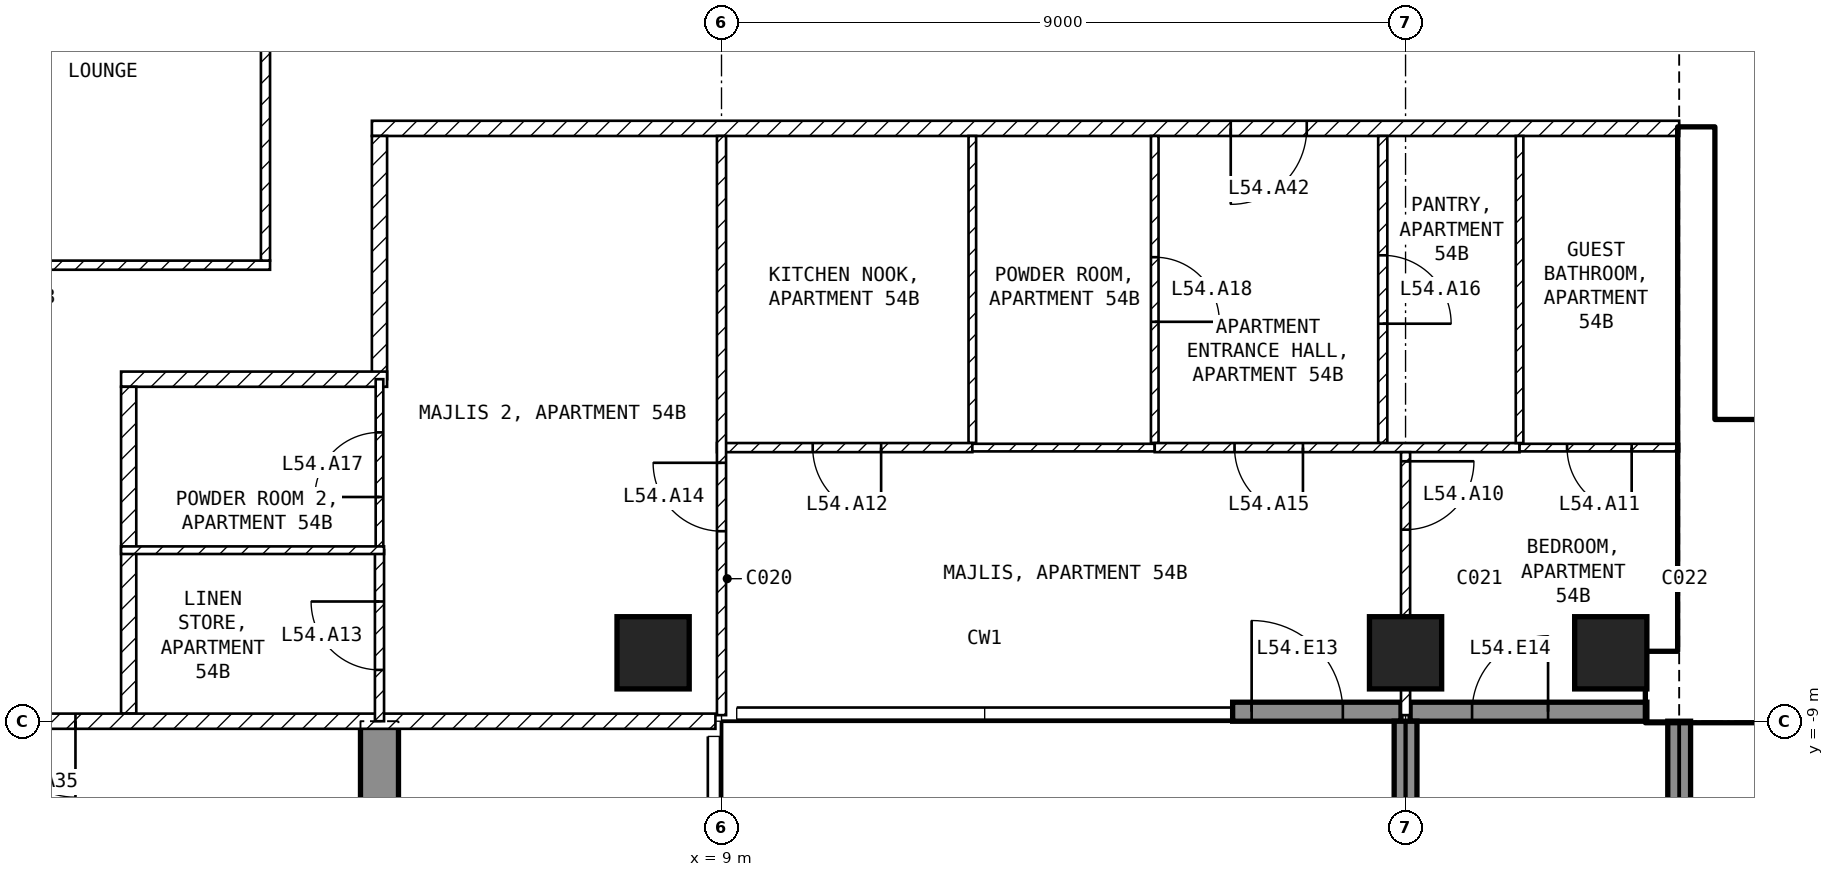
"""IFC4 building model, lengths in metres.
Left out: names, types, materials, properties, quantities, classifications, styles, units other than length and angle.
Written with IfcOpenShell. Run it as: python <this file> out.ifc"""

import sys

from ifc_helpers import new_model, si_unit, direction, frame, frame_2d, origin, origin_2d, place, context, subcontext, project, spatial, polyline, rectangle, outline, extrude, element, fill, save


model = new_model("IFC4")
c1 = context("Model", 3, precision=1e-05, world=origin(), true_north=direction((0.0, 1.0)))
c2 = subcontext(c1, "Body", "Model", "MODEL_VIEW")
j1 = project(units=[si_unit("LENGTHUNIT", "METRE"), si_unit("PLANEANGLEUNIT", "RADIAN")], contexts=[c1])
p1 = place(None, origin())
s1 = spatial("IfcSite", under=j1, at=p1, CompositionType="ELEMENT")
p2 = place(p1, origin())
s2 = spatial("IfcBuilding", under=s1, at=p2, CompositionType="ELEMENT")
p3 = place(p2, frame((0.0, 0.0, 215.6)))
s3 = spatial("IfcBuildingStorey", under=s2, at=p3, CompositionType="ELEMENT", Elevation=215.6)
for number, where, z_axis, x_axis in (
    (1, (8.1, -8.1, -0.25), (0.0, 0.0, 1.0), (1.0, 0.0, 0.0)),
    (2, (18.0, -8.1, -0.25), (0.0, 0.0, 1.0), (1.0, 0.0, 0.0)),
    (3, (20.7, -8.1, -0.25), (0.0, 0.0, 1.0), (1.0, 0.0, 0.0)),
):
    element("IfcColumn", number, at=place(p3, frame(where, z_axis=z_axis, x_axis=x_axis)), inside=s3, PredefinedType="COLUMN", context=c2, shape_type="SweptSolid", body=[
        extrude(rectangle(XDim=0.95, YDim=0.95, at=origin_2d()), origin(), (0.0, 0.0, 1.0), 3.5),
    ])
p4 = place(p3, frame((4.25, -20.225, -0.25), z_axis=(1.0, 0.0, 0.0), x_axis=(0.0, 1.0, 0.0)))
e4 = element("IfcWall", 4, at=p4, inside=s3, PredefinedType="SHEAR", context=c2, shape_type="SweptSolid", body=[
    extrude(outline(polyline([(0.0, 0.0), (6.725, 0.0), (6.725, 2.65), (9.125, 2.65), (9.125, 0.0), (11.225, 0.0), (11.225, 3.5), (0.0, 3.5), (0.0, 0.0)])), origin(), (0.0, 0.0, 1.0), 0.5),
])
p5 = place(p3, frame((15.725, -8.875, 0.0), z_axis=(0.0, 0.0, 1.0), x_axis=(1.0, 0.0, 0.0)))
e5 = element("IfcWall", 5, at=p5, inside=s3, PredefinedType="SOLIDWALL", context=c2, shape_type="SweptSolid", body=[
    extrude(rectangle(XDim=2.215, YDim=0.25, at=frame_2d((1.107, 0.0))), origin(), (0.0, 0.0, 1.0), 3.25),
])
p6 = place(p5, frame((0.25, 0.0, 0.0)))
e6 = element("IfcOpeningElement", 6, at=p6, cuts=e5, PredefinedType="OPENING", context=c2, shape_type="SweptSolid", body=[
    extrude(rectangle(XDim=1.2, YDim=2.4, at=frame_2d((0.6, 1.2))), frame((0.0, 0.135, 0.0), z_axis=(0.0, -1.0, 0.0), x_axis=(1.0, 0.0, 0.0)), (0.0, 0.0, 1.0), 0.27),
])
p7 = place(p3, frame((18.06, -8.875, 0.0), z_axis=(0.0, 0.0, 1.0), x_axis=(1.0, 0.0, 0.0)))
e7 = element("IfcWall", 7, at=p7, inside=s3, PredefinedType="SOLIDWALL", context=c2, shape_type="SweptSolid", body=[
    extrude(rectangle(XDim=3.115, YDim=0.25, at=frame_2d((1.558, 0.0))), origin(), (0.0, 0.0, 1.0), 3.25),
])
p8 = place(p7, frame((0.815, 0.0, 0.0)))
e8 = element("IfcOpeningElement", 8, at=p8, cuts=e7, PredefinedType="OPENING", context=c2, shape_type="SweptSolid", body=[
    extrude(rectangle(XDim=1.0, YDim=2.4, at=frame_2d((0.5, 1.2))), frame((0.0, 0.135, 0.0), z_axis=(0.0, -1.0, 0.0), x_axis=(1.0, 0.0, 0.0)), (0.0, 0.0, 1.0), 0.27),
])
for number, where, z_axis, x_axis in (
    (9, (18.0, -9.0, 0.0), (0.0, 0.0, 1.0), (0.0, -1.0, 0.0)),
    (10, (21.6, -9.0, 0.0), (0.0, 0.0, 1.0), (0.0, -1.0, 0.0)),
):
    element("IfcWall", number, at=place(p3, frame(where, z_axis=z_axis, x_axis=x_axis)), inside=s3, PredefinedType="SOLIDWALL", context=c2, shape_type="SweptSolid", body=[
        extrude(rectangle(XDim=2.7, YDim=0.3, at=frame_2d((1.35, 0.0))), origin(), (0.0, 0.0, 1.0), 3.25),
    ])
p9 = place(p3, frame((21.175, -8.55, 0.0), z_axis=(0.0, 0.0, 1.0), x_axis=(1.0, 0.0, 0.0)))
e11 = element("IfcWall", 11, at=p9, inside=s3, PredefinedType="SHEAR", context=c2, shape_type="SweptSolid", body=[
    extrude(rectangle(XDim=9.025, YDim=0.9, at=frame_2d((4.512, 0.0))), origin(), (0.0, 0.0, 1.0), 3.25),
])
p10 = place(p3, frame((21.825, -8.1, 0.0), z_axis=(0.0, 0.0, 1.0), x_axis=(0.0, 1.0, 0.0)))
e12 = element("IfcWall", 12, at=p10, inside=s3, PredefinedType="SHEAR", context=c2, shape_type="SweptSolid", body=[
    extrude(rectangle(XDim=6.9, YDim=0.45, at=frame_2d((3.45, 0.0))), origin(), (0.0, 0.0, 1.0), 3.25),
])
p11 = place(p3, frame((22.05, -5.15, 0.0), z_axis=(0.0, 0.0, 1.0), x_axis=(1.0, 0.0, 0.0)))
e13 = element("IfcWall", 13, at=p11, inside=s3, PredefinedType="SOLIDWALL", context=c2, shape_type="SweptSolid", body=[
    extrude(rectangle(XDim=6.3, YDim=0.2, at=frame_2d((3.15, 0.0))), origin(), (0.0, 0.0, 1.0), 3.25),
])
p12 = place(p11, frame((0.2, 0.0, 0.0)))
e14 = element("IfcOpeningElement", 14, at=p12, cuts=e13, PredefinedType="OPENING", context=c2, shape_type="SweptSolid", body=[
    extrude(rectangle(XDim=1.0, YDim=2.1, at=frame_2d((0.5, 1.05))), frame((0.0, 0.11, 0.0), z_axis=(0.0, -1.0, 0.0), x_axis=(1.0, 0.0, 0.0)), (0.0, 0.0, 1.0), 0.22),
])
p13 = place(p3, frame((-3.06, -3.0, 0.0), z_axis=(0.0, 0.0, 1.0), x_axis=(1.0, 0.0, 0.0)))
e15 = element("IfcWall", 15, at=p13, inside=s3, PredefinedType="PARTITIONING", context=c2, shape_type="SweptSolid", body=[
    extrude(rectangle(XDim=6.12, YDim=0.12, at=frame_2d((3.06, 0.0))), origin(), (0.0, 0.0, 1.0), 3.25),
])
p14 = place(p3, frame((3.0, -2.94, 0.0), z_axis=(0.0, 0.0, 1.0), x_axis=(0.0, 1.0, 0.0)))
e16 = element("IfcWall", 16, at=p14, inside=s3, PredefinedType="PARTITIONING", context=c2, shape_type="SweptSolid", body=[
    extrude(rectangle(XDim=5.88, YDim=0.12, at=frame_2d((2.94, 0.0))), origin(), (0.0, 0.0, 1.0), 3.25),
])
p15 = place(p3, frame((21.6, -1.2, 0.0), z_axis=(0.0, 0.0, 1.0), x_axis=(-1.0, 0.0, 0.0)))
e17 = element("IfcWall", 17, at=p15, inside=s3, PredefinedType="PARTITIONING", context=c2, shape_type="SweptSolid", body=[
    extrude(rectangle(XDim=17.2, YDim=0.2, at=frame_2d((8.6, 0.0))), origin(), (0.0, 0.0, 1.0), 3.25),
])
p16 = place(p15, frame((4.9, 0.0, 0.0)))
e18 = element("IfcOpeningElement", 18, at=p16, cuts=e17, PredefinedType="OPENING", context=c2, shape_type="SweptSolid", body=[
    extrude(rectangle(XDim=1.0, YDim=2.1, at=frame_2d((0.5, 1.05))), frame((0.0, 0.11, 0.0), z_axis=(0.0, -1.0, 0.0), x_axis=(1.0, 0.0, 0.0)), (0.0, 0.0, 1.0), 0.22),
])
p17 = place(p3, frame((4.5, -1.3, 0.0), z_axis=(0.0, 0.0, 1.0), x_axis=(0.0, -1.0, 0.0)))
e19 = element("IfcWall", 19, at=p17, inside=s3, PredefinedType="PARTITIONING", context=c2, shape_type="SweptSolid", body=[
    extrude(rectangle(XDim=3.2, YDim=0.2, at=frame_2d((1.6, 0.0))), origin(), (0.0, 0.0, 1.0), 3.25),
])
p18 = place(p3, frame((4.6, -4.5, 0.0), z_axis=(0.0, 0.0, 1.0), x_axis=(-1.0, 0.0, 0.0)))
e20 = element("IfcWall", 20, at=p18, inside=s3, PredefinedType="PARTITIONING", context=c2, shape_type="SweptSolid", body=[
    extrude(rectangle(XDim=3.5, YDim=0.2, at=frame_2d((1.75, 0.0))), origin(), (0.0, 0.0, 1.0), 3.25),
])
p19 = place(p3, frame((1.2, -4.6, 0.0), z_axis=(0.0, 0.0, 1.0), x_axis=(0.0, -1.0, 0.0)))
e21 = element("IfcWall", 21, at=p19, inside=s3, PredefinedType="PARTITIONING", context=c2, shape_type="SweptSolid", body=[
    extrude(rectangle(XDim=4.3, YDim=0.2, at=frame_2d((2.15, 0.0))), origin(), (0.0, 0.0, 1.0), 3.25),
])
p20 = place(p3, frame((8.92, -9.0, 0.0), z_axis=(0.0, 0.0, 1.0), x_axis=(-1.0, 0.0, 0.0)))
e22 = element("IfcWall", 22, at=p20, inside=s3, PredefinedType="PARTITIONING", context=c2, shape_type="SweptSolid", body=[
    extrude(rectangle(XDim=17.84, YDim=0.2, at=frame_2d((8.92, 0.0))), origin(), (0.0, 0.0, 1.0), 3.25),
])
p21 = place(p20, frame((8.42, 0.0, 0.0)))
e23 = element("IfcOpeningElement", 23, at=p21, cuts=e22, PredefinedType="OPENING", context=c2, shape_type="SweptSolid", body=[
    extrude(rectangle(XDim=1.0, YDim=2.1, at=frame_2d((0.5, 1.05))), frame((0.0, 0.11, 0.0), z_axis=(0.0, -1.0, 0.0), x_axis=(1.0, 0.0, 0.0)), (0.0, 0.0, 1.0), 0.22),
])
p22 = place(p3, frame((12.3, -1.3, 0.0), z_axis=(0.0, 0.0, 1.0), x_axis=(0.0, -1.0, 0.0)))
e24 = element("IfcWall", 24, at=p22, inside=s3, PredefinedType="PARTITIONING", context=c2, shape_type="SweptSolid", body=[
    extrude(rectangle(XDim=4.04, YDim=0.1, at=frame_2d((2.02, 0.0))), origin(), (0.0, 0.0, 1.0), 3.25),
])
p23 = place(p3, frame((12.3, -5.4, 0.0), z_axis=(0.0, 0.0, 1.0), x_axis=(-1.0, 0.0, 0.0)))
e25 = element("IfcWall", 25, at=p23, inside=s3, PredefinedType="PARTITIONING", context=c2, shape_type="SweptSolid", body=[
    extrude(rectangle(XDim=3.36, YDim=0.12, at=frame_2d((1.68, 0.0))), origin(), (0.0, 0.0, 1.0), 3.25),
])
p24 = place(p23, frame((1.2, 0.0, 0.0)))
e26 = element("IfcOpeningElement", 26, at=p24, cuts=e25, PredefinedType="OPENING", context=c2, shape_type="SweptSolid", body=[
    extrude(rectangle(XDim=0.9, YDim=2.1, at=frame_2d((0.45, 1.05))), frame((0.0, 0.07, 0.0), z_axis=(0.0, -1.0, 0.0), x_axis=(1.0, 0.0, 0.0)), (0.0, 0.0, 1.0), 0.14),
])
p25 = place(p3, frame((9.0, -8.92, 0.0), z_axis=(0.0, 0.0, 1.0), x_axis=(0.0, 1.0, 0.0)))
e27 = element("IfcWall", 27, at=p25, inside=s3, PredefinedType="PARTITIONING", context=c2, shape_type="SweptSolid", body=[
    extrude(rectangle(XDim=7.62, YDim=0.12, at=frame_2d((3.81, 0.0))), origin(), (0.0, 0.0, 1.0), 3.25),
])
p26 = place(p25, frame((2.42, 0.0, 0.0)))
e28 = element("IfcOpeningElement", 28, at=p26, cuts=e27, PredefinedType="OPENING", context=c2, shape_type="SweptSolid", body=[
    extrude(rectangle(XDim=0.9, YDim=2.1, at=frame_2d((0.45, 1.05))), frame((0.0, 0.07, 0.0), z_axis=(0.0, -1.0, 0.0), x_axis=(1.0, 0.0, 0.0)), (0.0, 0.0, 1.0), 0.14),
])
p27 = place(p3, frame((14.7, -1.3, 0.0), z_axis=(0.0, 0.0, 1.0), x_axis=(0.0, -1.0, 0.0)))
e29 = element("IfcWall", 29, at=p27, inside=s3, PredefinedType="PARTITIONING", context=c2, shape_type="SweptSolid", body=[
    extrude(rectangle(XDim=4.04, YDim=0.1, at=frame_2d((2.02, 0.0))), origin(), (0.0, 0.0, 1.0), 3.25),
])
p28 = place(p27, frame((1.595, 0.0, 0.0)))
e30 = element("IfcOpeningElement", 30, at=p28, cuts=e29, PredefinedType="OPENING", context=c2, shape_type="SweptSolid", body=[
    extrude(rectangle(XDim=0.85, YDim=2.1, at=frame_2d((0.425, 1.05))), frame((0.0, 0.06, 0.0), z_axis=(0.0, -1.0, 0.0), x_axis=(1.0, 0.0, 0.0)), (0.0, 0.0, 1.0), 0.12),
])
p29 = place(p3, frame((14.7, -5.4, 0.0), z_axis=(0.0, 0.0, 1.0), x_axis=(-1.0, 0.0, 0.0)))
e31 = element("IfcWall", 31, at=p29, inside=s3, PredefinedType="PARTITIONING", context=c2, shape_type="SweptSolid", body=[
    extrude(rectangle(XDim=2.4, YDim=0.1, at=frame_2d((1.2, 0.0))), origin(), (0.0, 0.0, 1.0), 3.25),
])
p30 = place(p3, frame((17.7, -1.3, 0.0), z_axis=(0.0, 0.0, 1.0), x_axis=(0.0, -1.0, 0.0)))
e32 = element("IfcWall", 32, at=p30, inside=s3, PredefinedType="PARTITIONING", context=c2, shape_type="SweptSolid", body=[
    extrude(rectangle(XDim=4.04, YDim=0.12, at=frame_2d((2.02, 0.0))), origin(), (0.0, 0.0, 1.0), 3.25),
])
p31 = place(p30, frame((1.57, 0.0, 0.0)))
e33 = element("IfcOpeningElement", 33, at=p31, cuts=e32, PredefinedType="OPENING", context=c2, shape_type="SweptSolid", body=[
    extrude(rectangle(XDim=0.9, YDim=2.1, at=frame_2d((0.45, 1.05))), frame((0.0, 0.07, 0.0), z_axis=(0.0, -1.0, 0.0), x_axis=(1.0, 0.0, 0.0)), (0.0, 0.0, 1.0), 0.14),
])
p32 = place(p3, frame((19.5, -5.4, 0.0), z_axis=(0.0, 0.0, 1.0), x_axis=(-1.0, 0.0, 0.0)))
e34 = element("IfcWall", 34, at=p32, inside=s3, PredefinedType="PARTITIONING", context=c2, shape_type="SweptSolid", body=[
    extrude(rectangle(XDim=4.8, YDim=0.12, at=frame_2d((2.4, 0.0))), origin(), (0.0, 0.0, 1.0), 3.25),
])
p33 = place(p32, frame((2.85, 0.0, 0.0)))
e35 = element("IfcOpeningElement", 35, at=p33, cuts=e34, PredefinedType="OPENING", context=c2, shape_type="SweptSolid", body=[
    extrude(rectangle(XDim=0.9, YDim=2.1, at=frame_2d((0.45, 1.05))), frame((0.0, 0.07, 0.0), z_axis=(0.0, -1.0, 0.0), x_axis=(1.0, 0.0, 0.0)), (0.0, 0.0, 1.0), 0.14),
])
p34 = place(p3, frame((19.5, -1.3, 0.0), z_axis=(0.0, 0.0, 1.0), x_axis=(0.0, -1.0, 0.0)))
e36 = element("IfcWall", 36, at=p34, inside=s3, PredefinedType="PARTITIONING", context=c2, shape_type="SweptSolid", body=[
    extrude(rectangle(XDim=4.04, YDim=0.1, at=frame_2d((2.02, 0.0))), origin(), (0.0, 0.0, 1.0), 3.25),
])
p35 = place(p3, frame((21.6, -5.4, 0.0), z_axis=(0.0, 0.0, 1.0), x_axis=(-1.0, 0.0, 0.0)))
e37 = element("IfcWall", 37, at=p35, inside=s3, PredefinedType="PARTITIONING", context=c2, shape_type="SweptSolid", body=[
    extrude(rectangle(XDim=2.1, YDim=0.1, at=frame_2d((1.05, 0.0))), origin(), (0.0, 0.0, 1.0), 3.25),
])
p36 = place(p35, frame((0.625, 0.0, 0.0)))
e38 = element("IfcOpeningElement", 38, at=p36, cuts=e37, PredefinedType="OPENING", context=c2, shape_type="SweptSolid", body=[
    extrude(rectangle(XDim=0.85, YDim=2.1, at=frame_2d((0.425, 1.05))), frame((0.0, 0.06, 0.0), z_axis=(0.0, -1.0, 0.0), x_axis=(1.0, 0.0, 0.0)), (0.0, 0.0, 1.0), 0.12),
])
p37 = place(p3, frame((18.0, -5.46, 0.0), z_axis=(0.0, 0.0, 1.0), x_axis=(0.0, -1.0, 0.0)))
e39 = element("IfcWall", 39, at=p37, inside=s3, PredefinedType="PARTITIONING", context=c2, shape_type="SweptSolid", body=[
    extrude(rectangle(XDim=3.46, YDim=0.12, at=frame_2d((1.73, 0.0))), origin(), (0.0, 0.0, 1.0), 2.48),
])
p38 = place(p37, frame((0.12, 0.0, 0.0)))
e40 = element("IfcOpeningElement", 40, at=p38, cuts=e39, PredefinedType="OPENING", context=c2, shape_type="SweptSolid", body=[
    extrude(rectangle(XDim=0.9, YDim=2.1, at=frame_2d((0.45, 1.05))), frame((0.0, 0.07, 0.0), z_axis=(0.0, -1.0, 0.0), x_axis=(1.0, 0.0, 0.0)), (0.0, 0.0, 1.0), 0.14),
])
p39 = place(p3, frame((4.5, -6.75, 0.0), z_axis=(0.0, 0.0, 1.0), x_axis=(0.0, 1.0, 0.0)))
e41 = element("IfcWall", 41, at=p39, inside=s3, PredefinedType="PARTITIONING", context=c2, shape_type="SweptSolid", body=[
    extrude(rectangle(XDim=2.25, YDim=0.1, at=frame_2d((1.125, 0.0))), origin(), (0.0, 0.0, 1.0), 3.25),
])
p40 = place(p39, frame((0.7, 0.0, 0.0)))
e42 = element("IfcOpeningElement", 42, at=p40, cuts=e41, PredefinedType="OPENING", context=c2, shape_type="SweptSolid", body=[
    extrude(rectangle(XDim=0.85, YDim=2.1, at=frame_2d((0.425, 1.05))), frame((0.0, 0.06, 0.0), z_axis=(0.0, -1.0, 0.0), x_axis=(1.0, 0.0, 0.0)), (0.0, 0.0, 1.0), 0.12),
])
p41 = place(p3, frame((4.5, -9.0, 0.0), z_axis=(0.0, 0.0, 1.0), x_axis=(0.0, 1.0, 0.0)))
e43 = element("IfcWall", 43, at=p41, inside=s3, PredefinedType="PARTITIONING", context=c2, shape_type="SweptSolid", body=[
    extrude(rectangle(XDim=2.25, YDim=0.12, at=frame_2d((1.125, 0.0))), origin(), (0.0, 0.0, 1.0), 3.25),
])
p42 = place(p41, frame((0.675, 0.0, 0.0)))
e44 = element("IfcOpeningElement", 44, at=p42, cuts=e43, PredefinedType="OPENING", context=c2, shape_type="SweptSolid", body=[
    extrude(rectangle(XDim=0.9, YDim=2.1, at=frame_2d((0.45, 1.05))), frame((0.0, 0.07, 0.0), z_axis=(0.0, -1.0, 0.0), x_axis=(1.0, 0.0, 0.0)), (0.0, 0.0, 1.0), 0.14),
])
p43 = place(p3, frame((4.56, -6.75, 0.0), z_axis=(0.0, 0.0, 1.0), x_axis=(-1.0, 0.0, 0.0)))
e45 = element("IfcWall", 45, at=p43, inside=s3, PredefinedType="PARTITIONING", context=c2, shape_type="SweptSolid", body=[
    extrude(rectangle(XDim=3.46, YDim=0.1, at=frame_2d((1.73, 0.0))), origin(), (0.0, 0.0, 1.0), 3.25),
])
p44 = place(p6, origin())
e46 = element("IfcDoor", 46, at=p44, inside=s3, OperationType="SINGLE_SWING_LEFT", PredefinedType="DOOR", context=c2, shape_type="SweptSolid", body=[
    extrude(rectangle(XDim=1.2, YDim=2.4, at=frame_2d((0.6, 1.2))), frame((0.0, 0.025, 0.0), z_axis=(0.0, -1.0, 0.0), x_axis=(1.0, 0.0, 0.0)), (0.0, 0.0, 1.0), 0.05),
])
fill(e6, e46)
p45 = place(p8, origin())
e47 = element("IfcDoor", 47, at=p45, inside=s3, OperationType="SINGLE_SWING_RIGHT", PredefinedType="DOOR", context=c2, shape_type="SweptSolid", body=[
    extrude(rectangle(XDim=1.0, YDim=2.4, at=frame_2d((0.5, 1.2))), frame((0.0, 0.025, 0.0), z_axis=(0.0, -1.0, 0.0), x_axis=(1.0, 0.0, 0.0)), (0.0, 0.0, 1.0), 0.05),
])
fill(e8, e47)
p46 = place(p12, origin())
e48 = element("IfcDoor", 48, at=p46, inside=s3, OperationType="SINGLE_SWING_LEFT", PredefinedType="DOOR", context=c2, shape_type="SweptSolid", body=[
    extrude(rectangle(XDim=1.0, YDim=2.1, at=frame_2d((0.5, 1.05))), frame((0.0, 0.025, 0.0), z_axis=(0.0, -1.0, 0.0), x_axis=(1.0, 0.0, 0.0)), (0.0, 0.0, 1.0), 0.05),
])
fill(e14, e48)
p47 = place(p38, origin())
e49 = element("IfcDoor", 49, at=p47, inside=s3, OperationType="SINGLE_SWING_LEFT", PredefinedType="DOOR", context=c2, shape_type="SweptSolid", body=[
    extrude(rectangle(XDim=0.9, YDim=2.1, at=frame_2d((0.45, 1.05))), frame((0.0, 0.025, 0.0), z_axis=(0.0, -1.0, 0.0), x_axis=(1.0, 0.0, 0.0)), (0.0, 0.0, 1.0), 0.05),
])
fill(e40, e49)
p48 = place(p36, origin())
e50 = element("IfcDoor", 50, at=p48, inside=s3, OperationType="SINGLE_SWING_LEFT", PredefinedType="DOOR", context=c2, shape_type="SweptSolid", body=[
    extrude(rectangle(XDim=0.85, YDim=2.1, at=frame_2d((0.425, 1.05))), frame((0.0, 0.025, 0.0), z_axis=(0.0, -1.0, 0.0), x_axis=(1.0, 0.0, 0.0)), (0.0, 0.0, 1.0), 0.05),
])
fill(e38, e50)
p49 = place(p24, origin())
e51 = element("IfcDoor", 51, at=p49, inside=s3, OperationType="SINGLE_SWING_LEFT", PredefinedType="DOOR", context=c2, shape_type="SweptSolid", body=[
    extrude(rectangle(XDim=0.9, YDim=2.1, at=frame_2d((0.45, 1.05))), frame((0.0, 0.025, 0.0), z_axis=(0.0, -1.0, 0.0), x_axis=(1.0, 0.0, 0.0)), (0.0, 0.0, 1.0), 0.05),
])
fill(e26, e51)
p50 = place(p42, origin())
e52 = element("IfcDoor", 52, at=p50, inside=s3, OperationType="SINGLE_SWING_RIGHT", PredefinedType="DOOR", context=c2, shape_type="SweptSolid", body=[
    extrude(rectangle(XDim=0.9, YDim=2.1, at=frame_2d((0.45, 1.05))), frame((0.0, 0.025, 0.0), z_axis=(0.0, -1.0, 0.0), x_axis=(1.0, 0.0, 0.0)), (0.0, 0.0, 1.0), 0.05),
])
fill(e44, e52)
p51 = place(p26, origin())
e53 = element("IfcDoor", 53, at=p51, inside=s3, OperationType="SINGLE_SWING_RIGHT", PredefinedType="DOOR", context=c2, shape_type="SweptSolid", body=[
    extrude(rectangle(XDim=0.9, YDim=2.1, at=frame_2d((0.45, 1.05))), frame((0.0, 0.025, 0.0), z_axis=(0.0, -1.0, 0.0), x_axis=(1.0, 0.0, 0.0)), (0.0, 0.0, 1.0), 0.05),
])
fill(e28, e53)
p52 = place(p33, origin())
e54 = element("IfcDoor", 54, at=p52, inside=s3, OperationType="SINGLE_SWING_LEFT", PredefinedType="DOOR", context=c2, shape_type="SweptSolid", body=[
    extrude(rectangle(XDim=0.9, YDim=2.1, at=frame_2d((0.45, 1.05))), frame((0.0, 0.025, 0.0), z_axis=(0.0, -1.0, 0.0), x_axis=(1.0, 0.0, 0.0)), (0.0, 0.0, 1.0), 0.05),
])
fill(e35, e54)
p53 = place(p31, origin())
e55 = element("IfcDoor", 55, at=p53, inside=s3, OperationType="SINGLE_SWING_RIGHT", PredefinedType="DOOR", context=c2, shape_type="SweptSolid", body=[
    extrude(rectangle(XDim=0.9, YDim=2.1, at=frame_2d((0.45, 1.05))), frame((0.0, 0.025, 0.0), z_axis=(0.0, -1.0, 0.0), x_axis=(1.0, 0.0, 0.0)), (0.0, 0.0, 1.0), 0.05),
])
fill(e33, e55)
p54 = place(p40, origin())
e56 = element("IfcDoor", 56, at=p54, inside=s3, OperationType="SINGLE_SWING_LEFT", PredefinedType="DOOR", context=c2, shape_type="SweptSolid", body=[
    extrude(rectangle(XDim=0.85, YDim=2.1, at=frame_2d((0.425, 1.05))), frame((0.0, 0.025, 0.0), z_axis=(0.0, -1.0, 0.0), x_axis=(1.0, 0.0, 0.0)), (0.0, 0.0, 1.0), 0.05),
])
fill(e42, e56)
p55 = place(p28, origin())
e57 = element("IfcDoor", 57, at=p55, inside=s3, OperationType="SINGLE_SWING_RIGHT", PredefinedType="DOOR", context=c2, shape_type="SweptSolid", body=[
    extrude(rectangle(XDim=0.85, YDim=2.1, at=frame_2d((0.425, 1.05))), frame((0.0, 0.025, 0.0), z_axis=(0.0, -1.0, 0.0), x_axis=(1.0, 0.0, 0.0)), (0.0, 0.0, 1.0), 0.05),
])
fill(e30, e57)
p56 = place(p21, origin())
e58 = element("IfcDoor", 58, at=p56, inside=s3, OperationType="SINGLE_SWING_LEFT", PredefinedType="DOOR", context=c2, shape_type="SweptSolid", body=[
    extrude(rectangle(XDim=1.0, YDim=2.1, at=frame_2d((0.5, 1.05))), frame((0.0, 0.025, 0.0), z_axis=(0.0, -1.0, 0.0), x_axis=(1.0, 0.0, 0.0)), (0.0, 0.0, 1.0), 0.05),
])
fill(e23, e58)
p57 = place(p16, origin())
e59 = element("IfcDoor", 59, at=p57, inside=s3, OperationType="SINGLE_SWING_RIGHT", PredefinedType="DOOR", context=c2, shape_type="SweptSolid", body=[
    extrude(rectangle(XDim=1.0, YDim=2.1, at=frame_2d((0.5, 1.05))), frame((0.0, 0.025, 0.0), z_axis=(0.0, -1.0, 0.0), x_axis=(1.0, 0.0, 0.0)), (0.0, 0.0, 1.0), 0.05),
])
fill(e18, e59)
save(model, sys.argv[1])
